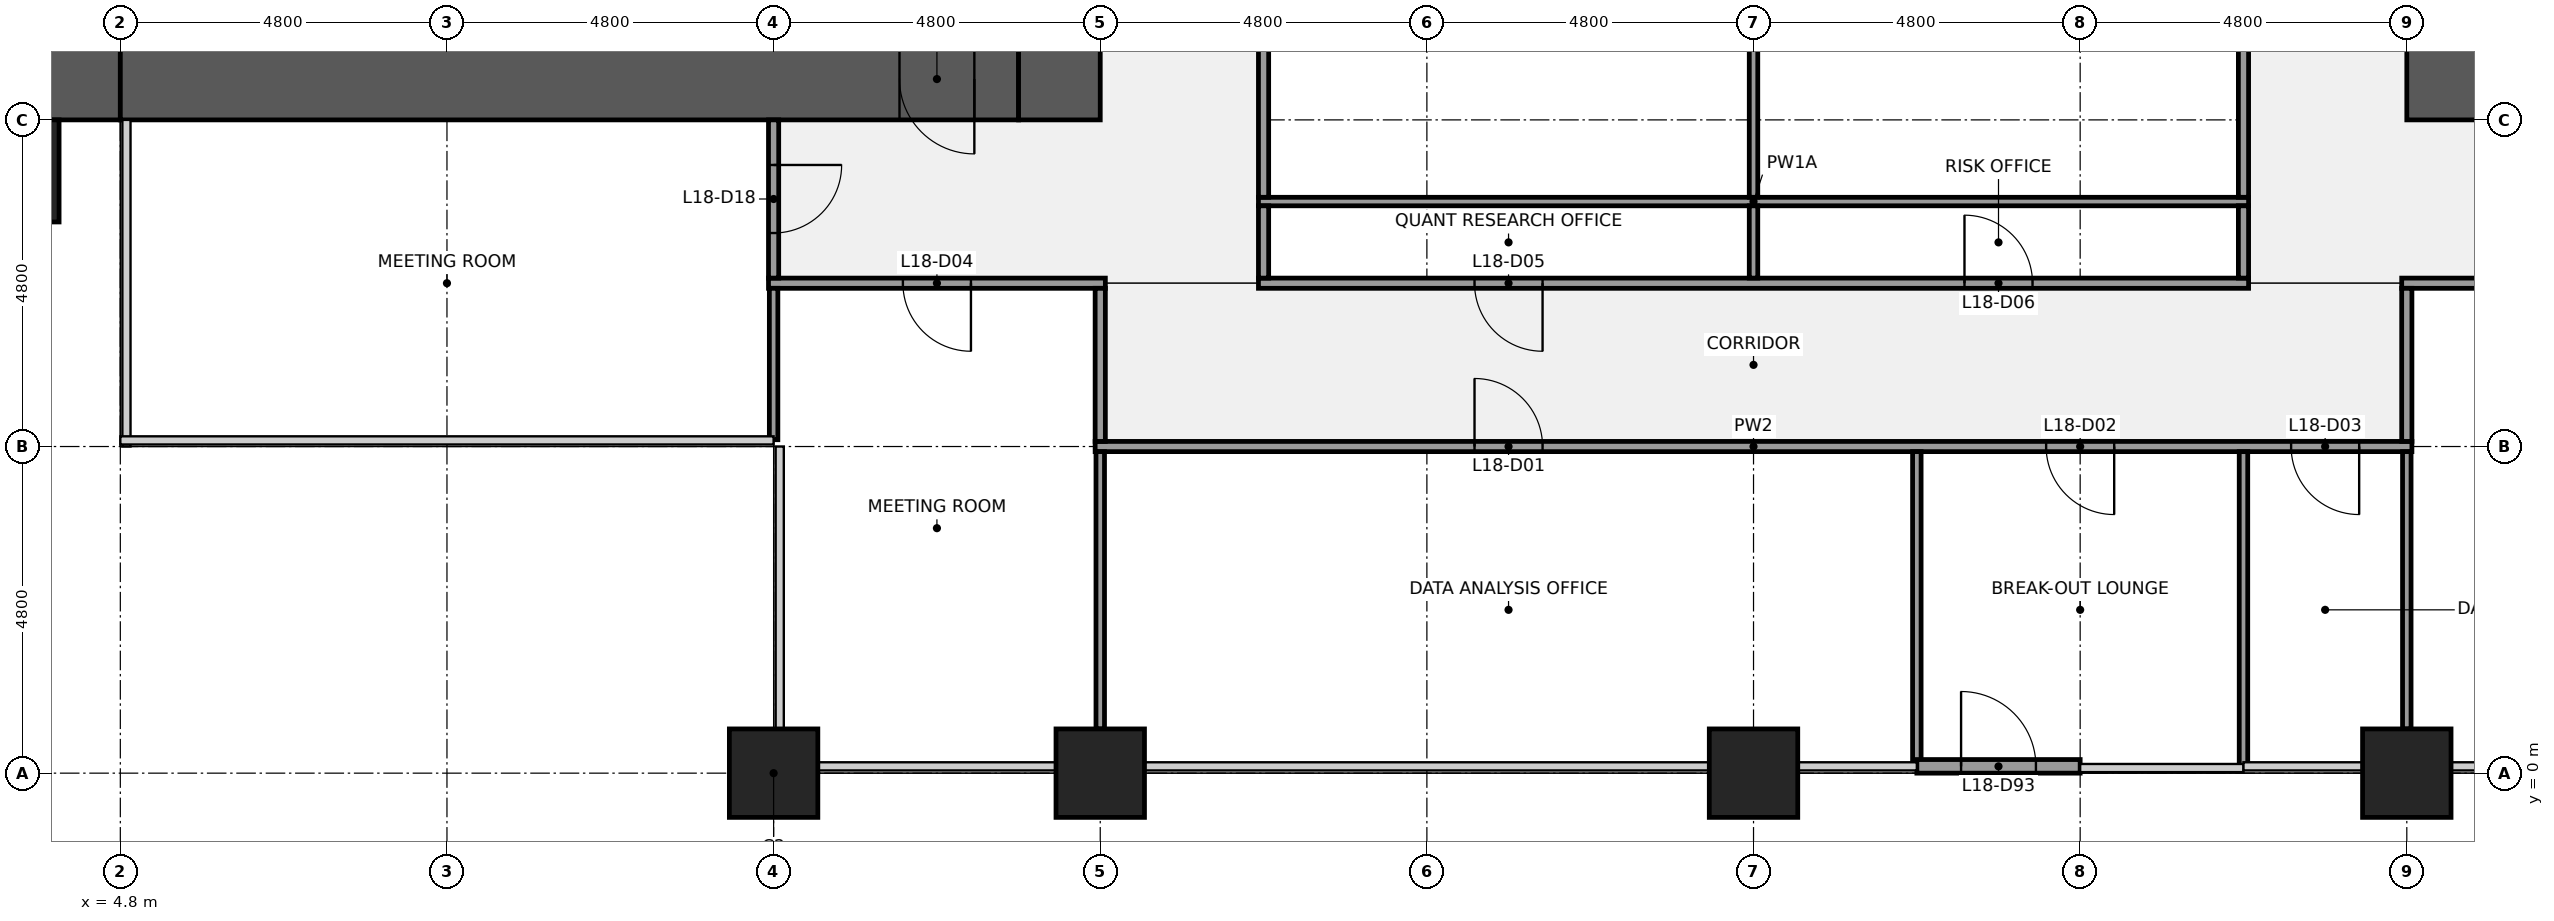
"""IFC4 building model, lengths in metres.
Left out: names, types, materials, properties, quantities, classifications, styles, units other than length and angle.
Written with IfcOpenShell. Run it as: python <this file> out.ifc"""

import sys

from ifc_helpers import new_model, si_unit, direction, frame, frame_2d, origin, origin_2d, place, context, subcontext, project, spatial, rectangle, extrude, element, fill, save


model = new_model("IFC4")
c1 = context("Model", 3, precision=1e-05, world=origin(), true_north=direction((0.0, 1.0)))
c2 = subcontext(c1, "Body", "Model", "MODEL_VIEW")
j1 = project(units=[si_unit("LENGTHUNIT", "METRE"), si_unit("PLANEANGLEUNIT", "RADIAN")], contexts=[c1])
p1 = place(None, origin())
s1 = spatial("IfcSite", under=j1, at=p1, CompositionType="ELEMENT")
p2 = place(p1, origin())
s2 = spatial("IfcBuilding", under=s1, at=p2, CompositionType="ELEMENT")
p3 = place(p2, frame((0.0, 0.0, 83.0)))
s3 = spatial("IfcBuildingStorey", under=s2, at=p3, CompositionType="ELEMENT", Elevation=83.0)
for number, where, z_axis, x_axis in (
    (1, (14.4, 0.0, 0.0), (0.0, 0.0, 1.0), (1.0, 0.0, 0.0)),
    (2, (19.2, 0.0, 0.0), (0.0, 0.0, 1.0), (1.0, 0.0, 0.0)),
    (3, (28.8, 0.0, 0.0), (0.0, 0.0, 1.0), (1.0, 0.0, 0.0)),
    (4, (38.4, 0.0, 0.0), (0.0, 0.0, 1.0), (1.0, 0.0, 0.0)),
):
    element("IfcColumn", number, at=place(p3, frame(where, z_axis=z_axis, x_axis=x_axis)), inside=s3, PredefinedType="COLUMN", context=c2, shape_type="SweptSolid", body=[
        extrude(rectangle(XDim=1.3, YDim=1.3, at=origin_2d()), origin(), (0.0, 0.0, 1.0), 4.0),
    ])
p4 = place(p3, frame((4.8, 10.2, 0.0), z_axis=(0.0, 0.0, 1.0), x_axis=(-1.0, 0.0, 0.0)))
e5 = element("IfcWall", 5, at=p4, inside=s3, PredefinedType="SHEAR", context=c2, shape_type="SweptSolid", body=[
    extrude(rectangle(XDim=3.6, YDim=1.2, at=frame_2d((1.8, 0.0))), origin(), (0.0, 0.0, 1.0), 3.7),
])
p5 = place(p3, frame((18.0, 10.2, 0.0), z_axis=(0.0, 0.0, 1.0), x_axis=(-1.0, 0.0, 0.0)))
e6 = element("IfcWall", 6, at=p5, inside=s3, PredefinedType="SHEAR", context=c2, shape_type="SweptSolid", body=[
    extrude(rectangle(XDim=13.2, YDim=1.2, at=frame_2d((6.6, 0.0))), origin(), (0.0, 0.0, 1.0), 3.7),
])
p6 = place(p5, frame((0.65, 0.0, 0.0)))
e7 = element("IfcOpeningElement", 7, at=p6, cuts=e6, PredefinedType="OPENING", context=c2, shape_type="SweptSolid", body=[
    extrude(rectangle(XDim=1.1, YDim=2.1, at=frame_2d((0.55, 1.05))), frame((0.0, 0.61, 0.0), z_axis=(0.0, -1.0, 0.0), x_axis=(1.0, 0.0, 0.0)), (0.0, 0.0, 1.0), 1.22),
])
p7 = place(p3, frame((18.6, 38.4, 0.0), z_axis=(0.0, 0.0, 1.0), x_axis=(0.0, -1.0, 0.0)))
e8 = element("IfcWall", 8, at=p7, inside=s3, PredefinedType="SHEAR", context=c2, shape_type="SweptSolid", body=[
    extrude(rectangle(XDim=28.8, YDim=1.2, at=frame_2d((14.4, 0.0))), origin(), (0.0, 0.0, 1.0), 3.7),
])
p8 = place(p7, frame((18.3, 0.0, 0.0)))
e9 = element("IfcOpeningElement", 9, at=p8, cuts=e8, PredefinedType="OPENING", context=c2, shape_type="SweptSolid", body=[
    extrude(rectangle(XDim=1.8, YDim=2.1, at=frame_2d((0.9, 1.05))), frame((0.0, 0.61, 0.0), z_axis=(0.0, -1.0, 0.0), x_axis=(1.0, 0.0, 0.0)), (0.0, 0.0, 1.0), 1.22),
])
p9 = place(p7, frame((8.7, 0.0, 0.0)))
e10 = element("IfcOpeningElement", 10, at=p9, cuts=e8, PredefinedType="OPENING", context=c2, shape_type="SweptSolid", body=[
    extrude(rectangle(XDim=1.8, YDim=2.1, at=frame_2d((0.9, 1.05))), frame((0.0, 0.61, 0.0), z_axis=(0.0, -1.0, 0.0), x_axis=(1.0, 0.0, 0.0)), (0.0, 0.0, 1.0), 1.22),
])
p10 = place(p3, frame((39.0, 9.6, 0.0), z_axis=(0.0, 0.0, 1.0), x_axis=(0.0, 1.0, 0.0)))
e11 = element("IfcWall", 11, at=p10, inside=s3, PredefinedType="SHEAR", context=c2, shape_type="SweptSolid", body=[
    extrude(rectangle(XDim=28.8, YDim=1.2, at=frame_2d((14.4, 0.0))), origin(), (0.0, 0.0, 1.0), 3.7),
])
p11 = place(p10, frame((8.7, 0.0, 0.0)))
e12 = element("IfcOpeningElement", 12, at=p11, cuts=e11, PredefinedType="OPENING", context=c2, shape_type="SweptSolid", body=[
    extrude(rectangle(XDim=1.8, YDim=2.1, at=frame_2d((0.9, 1.05))), frame((0.0, 0.61, 0.0), z_axis=(0.0, -1.0, 0.0), x_axis=(1.0, 0.0, 0.0)), (0.0, 0.0, 1.0), 1.22),
])
p12 = place(p10, frame((18.3, 0.0, 0.0)))
e13 = element("IfcOpeningElement", 13, at=p12, cuts=e11, PredefinedType="OPENING", context=c2, shape_type="SweptSolid", body=[
    extrude(rectangle(XDim=1.8, YDim=2.1, at=frame_2d((0.9, 1.05))), frame((0.0, 0.61, 0.0), z_axis=(0.0, -1.0, 0.0), x_axis=(1.0, 0.0, 0.0)), (0.0, 0.0, 1.0), 1.22),
])
p13 = place(p3, frame((19.125, 4.8, 0.0), z_axis=(0.0, 0.0, 1.0), x_axis=(1.0, 0.0, 0.0)))
e14 = element("IfcWall", 14, at=p13, inside=s3, PredefinedType="PARTITIONING", context=c2, shape_type="SweptSolid", body=[
    extrude(rectangle(XDim=19.35, YDim=0.15, at=frame_2d((9.675, 0.0))), origin(), (0.0, 0.0, 1.0), 2.709),
])
p14 = place(p13, frame((5.575, 0.0, 0.0)))
e15 = element("IfcOpeningElement", 15, at=p14, cuts=e14, PredefinedType="OPENING", context=c2, shape_type="SweptSolid", body=[
    extrude(rectangle(XDim=1.0, YDim=2.1, at=frame_2d((0.5, 1.05))), frame((0.0, 0.085, 0.0), z_axis=(0.0, -1.0, 0.0), x_axis=(1.0, 0.0, 0.0)), (0.0, 0.0, 1.0), 0.17),
])
p15 = place(p13, frame((13.975, 0.0, 0.0)))
e16 = element("IfcOpeningElement", 16, at=p15, cuts=e14, PredefinedType="OPENING", context=c2, shape_type="SweptSolid", body=[
    extrude(rectangle(XDim=1.0, YDim=2.1, at=frame_2d((0.5, 1.05))), frame((0.0, 0.085, 0.0), z_axis=(0.0, -1.0, 0.0), x_axis=(1.0, 0.0, 0.0)), (0.0, 0.0, 1.0), 0.17),
])
p16 = place(p13, frame((17.575, 0.0, 0.0)))
e17 = element("IfcOpeningElement", 17, at=p16, cuts=e14, PredefinedType="OPENING", context=c2, shape_type="SweptSolid", body=[
    extrude(rectangle(XDim=1.0, YDim=2.1, at=frame_2d((0.5, 1.05))), frame((0.0, 0.085, 0.0), z_axis=(0.0, -1.0, 0.0), x_axis=(1.0, 0.0, 0.0)), (0.0, 0.0, 1.0), 0.17),
])
p17 = place(p3, frame((14.325, 7.2, 0.0), z_axis=(0.0, 0.0, 1.0), x_axis=(1.0, 0.0, 0.0)))
e18 = element("IfcWall", 18, at=p17, inside=s3, PredefinedType="PARTITIONING", context=c2, shape_type="SweptSolid", body=[
    extrude(rectangle(XDim=4.95, YDim=0.15, at=frame_2d((2.475, 0.0))), origin(), (0.0, 0.0, 1.0), 2.709),
])
p18 = place(p17, frame((1.975, 0.0, 0.0)))
e19 = element("IfcOpeningElement", 19, at=p18, cuts=e18, PredefinedType="OPENING", context=c2, shape_type="SweptSolid", body=[
    extrude(rectangle(XDim=1.0, YDim=2.1, at=frame_2d((0.5, 1.05))), frame((0.0, 0.085, 0.0), z_axis=(0.0, -1.0, 0.0), x_axis=(1.0, 0.0, 0.0)), (0.0, 0.0, 1.0), 0.17),
])
p19 = place(p3, frame((21.525, 7.2, 0.0), z_axis=(0.0, 0.0, 1.0), x_axis=(1.0, 0.0, 0.0)))
e20 = element("IfcWall", 20, at=p19, inside=s3, PredefinedType="PARTITIONING", context=c2, shape_type="SweptSolid", body=[
    extrude(rectangle(XDim=14.55, YDim=0.15, at=frame_2d((7.275, 0.0))), origin(), (0.0, 0.0, 1.0), 2.709),
])
p20 = place(p19, frame((3.175, 0.0, 0.0)))
e21 = element("IfcOpeningElement", 21, at=p20, cuts=e20, PredefinedType="OPENING", context=c2, shape_type="SweptSolid", body=[
    extrude(rectangle(XDim=1.0, YDim=2.1, at=frame_2d((0.5, 1.05))), frame((0.0, 0.085, 0.0), z_axis=(0.0, -1.0, 0.0), x_axis=(1.0, 0.0, 0.0)), (0.0, 0.0, 1.0), 0.17),
])
p21 = place(p19, frame((10.375, 0.0, 0.0)))
e22 = element("IfcOpeningElement", 22, at=p21, cuts=e20, PredefinedType="OPENING", context=c2, shape_type="SweptSolid", body=[
    extrude(rectangle(XDim=1.0, YDim=2.1, at=frame_2d((0.5, 1.05))), frame((0.0, 0.085, 0.0), z_axis=(0.0, -1.0, 0.0), x_axis=(1.0, 0.0, 0.0)), (0.0, 0.0, 1.0), 0.17),
])
p22 = place(p3, frame((38.325, 7.2, 0.0), z_axis=(0.0, 0.0, 1.0), x_axis=(1.0, 0.0, 0.0)))
e23 = element("IfcWall", 23, at=p22, inside=s3, PredefinedType="PARTITIONING", context=c2, shape_type="SweptSolid", body=[
    extrude(rectangle(XDim=4.95, YDim=0.15, at=frame_2d((2.475, 0.0))), origin(), (0.0, 0.0, 1.0), 2.709),
])
p23 = place(p22, frame((1.975, 0.0, 0.0)))
e24 = element("IfcOpeningElement", 24, at=p23, cuts=e23, PredefinedType="OPENING", context=c2, shape_type="SweptSolid", body=[
    extrude(rectangle(XDim=1.0, YDim=2.1, at=frame_2d((0.5, 1.05))), frame((0.0, 0.085, 0.0), z_axis=(0.0, -1.0, 0.0), x_axis=(1.0, 0.0, 0.0)), (0.0, 0.0, 1.0), 0.17),
])
p24 = place(p3, frame((21.525, 8.4, 0.0), z_axis=(0.0, 0.0, 1.0), x_axis=(1.0, 0.0, 0.0)))
e25 = element("IfcWall", 25, at=p24, inside=s3, PredefinedType="PARTITIONING", context=c2, shape_type="SweptSolid", body=[
    extrude(rectangle(XDim=14.55, YDim=0.125, at=frame_2d((7.275, 0.0))), origin(), (0.0, 0.0, 1.0), 2.709),
])
p25 = place(p3, frame((14.4, 4.9, 0.0), z_axis=(0.0, 0.0, 1.0), x_axis=(0.0, 1.0, 0.0)))
e26 = element("IfcWall", 26, at=p25, inside=s3, PredefinedType="PARTITIONING", context=c2, shape_type="SweptSolid", body=[
    extrude(rectangle(XDim=2.225, YDim=0.125, at=frame_2d((1.113, 0.0))), origin(), (0.0, 0.0, 1.0), 2.709),
])
p26 = place(p3, frame((14.4, 7.275, 0.0), z_axis=(0.0, 0.0, 1.0), x_axis=(0.0, 1.0, 0.0)))
e27 = element("IfcWall", 27, at=p26, inside=s3, PredefinedType="PARTITIONING", context=c2, shape_type="SweptSolid", body=[
    extrude(rectangle(XDim=2.325, YDim=0.15, at=frame_2d((1.163, 0.0))), origin(), (0.0, 0.0, 1.0), 2.709),
])
p27 = place(p26, frame((0.663, 0.0, 0.0)))
e28 = element("IfcOpeningElement", 28, at=p27, cuts=e27, PredefinedType="OPENING", context=c2, shape_type="SweptSolid", body=[
    extrude(rectangle(XDim=1.0, YDim=2.1, at=frame_2d((0.5, 1.05))), frame((0.0, 0.085, 0.0), z_axis=(0.0, -1.0, 0.0), x_axis=(1.0, 0.0, 0.0)), (0.0, 0.0, 1.0), 0.17),
])
p28 = place(p3, frame((19.2, 0.65, 0.0), z_axis=(0.0, 0.0, 1.0), x_axis=(0.0, 1.0, 0.0)))
e29 = element("IfcWall", 29, at=p28, inside=s3, PredefinedType="PARTITIONING", context=c2, shape_type="SweptSolid", body=[
    extrude(rectangle(XDim=4.075, YDim=0.125, at=frame_2d((2.038, 0.0))), origin(), (0.0, 0.0, 1.0), 2.709),
])
p29 = place(p3, frame((19.2, 4.875, 0.0), z_axis=(0.0, 0.0, 1.0), x_axis=(0.0, 1.0, 0.0)))
e30 = element("IfcWall", 30, at=p29, inside=s3, PredefinedType="PARTITIONING", context=c2, shape_type="SweptSolid", body=[
    extrude(rectangle(XDim=2.25, YDim=0.15, at=frame_2d((1.125, 0.0))), origin(), (0.0, 0.0, 1.0), 2.709),
])
p30 = place(p3, frame((21.6, 7.275, 0.0), z_axis=(0.0, 0.0, 1.0), x_axis=(0.0, 1.0, 0.0)))
e31 = element("IfcWall", 31, at=p30, inside=s3, PredefinedType="PARTITIONING", context=c2, shape_type="SweptSolid", body=[
    extrude(rectangle(XDim=1.062, YDim=0.15, at=frame_2d((0.531, 0.0))), origin(), (0.0, 0.0, 1.0), 2.709),
])
p31 = place(p3, frame((21.6, 8.462, 0.0), z_axis=(0.0, 0.0, 1.0), x_axis=(0.0, 1.0, 0.0)))
e32 = element("IfcWall", 32, at=p31, inside=s3, PredefinedType="PARTITIONING", context=c2, shape_type="SweptSolid", body=[
    extrude(rectangle(XDim=5.875, YDim=0.15, at=frame_2d((2.938, 0.0))), origin(), (0.0, 0.0, 1.0), 2.709),
])
p32 = place(p31, frame((2.438, 0.0, 0.0)))
e33 = element("IfcOpeningElement", 33, at=p32, cuts=e32, PredefinedType="OPENING", context=c2, shape_type="SweptSolid", body=[
    extrude(rectangle(XDim=1.0, YDim=2.1, at=frame_2d((0.5, 1.05))), frame((0.0, 0.085, 0.0), z_axis=(0.0, -1.0, 0.0), x_axis=(1.0, 0.0, 0.0)), (0.0, 0.0, 1.0), 0.17),
])
p33 = place(p3, frame((28.8, 7.275, 0.0), z_axis=(0.0, 0.0, 1.0), x_axis=(0.0, 1.0, 0.0)))
e34 = element("IfcWall", 34, at=p33, inside=s3, PredefinedType="PARTITIONING", context=c2, shape_type="SweptSolid", body=[
    extrude(rectangle(XDim=1.062, YDim=0.125, at=frame_2d((0.531, 0.0))), origin(), (0.0, 0.0, 1.0), 2.709),
])
p34 = place(p3, frame((28.8, 8.462, 0.0), z_axis=(0.0, 0.0, 1.0), x_axis=(0.0, 1.0, 0.0)))
e35 = element("IfcWall", 35, at=p34, inside=s3, PredefinedType="PARTITIONING", context=c2, shape_type="SweptSolid", body=[
    extrude(rectangle(XDim=5.875, YDim=0.125, at=frame_2d((2.938, 0.0))), origin(), (0.0, 0.0, 1.0), 2.709),
])
for number, where, z_axis, x_axis in (
    (36, (31.2, 0.1, 0.0), (0.0, 0.0, 1.0), (0.0, 1.0, 0.0)),
    (37, (36.0, 0.1, 0.0), (0.0, 0.0, 1.0), (0.0, 1.0, 0.0)),
):
    element("IfcWall", number, at=place(p3, frame(where, z_axis=z_axis, x_axis=x_axis)), inside=s3, PredefinedType="PARTITIONING", context=c2, shape_type="SweptSolid", body=[
        extrude(rectangle(XDim=4.625, YDim=0.125, at=frame_2d((2.312, 0.0))), origin(), (0.0, 0.0, 1.0), 2.709),
    ])
p35 = place(p3, frame((36.0, 7.275, 0.0), z_axis=(0.0, 0.0, 1.0), x_axis=(0.0, 1.0, 0.0)))
e38 = element("IfcWall", 38, at=p35, inside=s3, PredefinedType="PARTITIONING", context=c2, shape_type="SweptSolid", body=[
    extrude(rectangle(XDim=1.062, YDim=0.15, at=frame_2d((0.531, 0.0))), origin(), (0.0, 0.0, 1.0), 2.709),
])
p36 = place(p3, frame((36.0, 8.462, 0.0), z_axis=(0.0, 0.0, 1.0), x_axis=(0.0, 1.0, 0.0)))
e39 = element("IfcWall", 39, at=p36, inside=s3, PredefinedType="PARTITIONING", context=c2, shape_type="SweptSolid", body=[
    extrude(rectangle(XDim=5.875, YDim=0.15, at=frame_2d((2.938, 0.0))), origin(), (0.0, 0.0, 1.0), 2.709),
])
p37 = place(p36, frame((2.438, 0.0, 0.0)))
e40 = element("IfcOpeningElement", 40, at=p37, cuts=e39, PredefinedType="OPENING", context=c2, shape_type="SweptSolid", body=[
    extrude(rectangle(XDim=1.0, YDim=2.1, at=frame_2d((0.5, 1.05))), frame((0.0, 0.085, 0.0), z_axis=(0.0, -1.0, 0.0), x_axis=(1.0, 0.0, 0.0)), (0.0, 0.0, 1.0), 0.17),
])
p38 = place(p3, frame((38.4, 0.65, 0.0), z_axis=(0.0, 0.0, 1.0), x_axis=(0.0, 1.0, 0.0)))
e41 = element("IfcWall", 41, at=p38, inside=s3, PredefinedType="PARTITIONING", context=c2, shape_type="SweptSolid", body=[
    extrude(rectangle(XDim=4.075, YDim=0.125, at=frame_2d((2.038, 0.0))), origin(), (0.0, 0.0, 1.0), 2.709),
])
p39 = place(p3, frame((38.4, 4.875, 0.0), z_axis=(0.0, 0.0, 1.0), x_axis=(0.0, 1.0, 0.0)))
e42 = element("IfcWall", 42, at=p39, inside=s3, PredefinedType="PARTITIONING", context=c2, shape_type="SweptSolid", body=[
    extrude(rectangle(XDim=2.25, YDim=0.15, at=frame_2d((1.125, 0.0))), origin(), (0.0, 0.0, 1.0), 2.709),
])
p40 = place(p3, frame((2.4, 8.85, 0.0), z_axis=(0.0, 0.0, 1.0), x_axis=(1.0, 0.0, 0.0)))
e43 = element("IfcColumn", 43, at=p40, inside=s3, PredefinedType="PILASTER", context=c2, shape_type="SweptSolid", body=[
    extrude(rectangle(XDim=3.0, YDim=1.5, at=origin_2d()), origin(), (0.0, 0.0, 1.0), 4.0),
])
p41 = place(p3, frame((31.2, 0.1, 0.0), z_axis=(0.0, 0.0, 1.0), x_axis=(1.0, 0.0, 0.0)))
e44 = element("IfcWall", 44, at=p41, inside=s3, PredefinedType="SOLIDWALL", context=c2, shape_type="SweptSolid", body=[
    extrude(rectangle(XDim=2.4, YDim=0.2, at=frame_2d((1.2, 0.0))), origin(), (0.0, 0.0, 1.0), 3.301),
])
p42 = place(p41, frame((0.65, 0.0, 0.0)))
e45 = element("IfcOpeningElement", 45, at=p42, cuts=e44, PredefinedType="OPENING", context=c2, shape_type="SweptSolid", body=[
    extrude(rectangle(XDim=1.1, YDim=2.1, at=frame_2d((0.55, 1.05))), frame((0.0, 0.11, 0.0), z_axis=(0.0, -1.0, 0.0), x_axis=(1.0, 0.0, 0.0)), (0.0, 0.0, 1.0), 0.22),
])
for number, where, z_axis, x_axis in (
    (46, (14.4, -1.075, 0.0), (0.0, 0.0, 1.0), (1.0, 0.0, 0.0)),
    (47, (19.2, -1.075, 0.0), (0.0, 0.0, 1.0), (1.0, 0.0, 0.0)),
    (48, (38.4, -1.075, 0.0), (0.0, 0.0, 1.0), (1.0, 0.0, 0.0)),
):
    element("IfcColumn", number, at=place(p3, frame(where, z_axis=z_axis, x_axis=x_axis)), inside=s3, PredefinedType="PILASTER", context=c2, shape_type="SweptSolid", body=[
        extrude(rectangle(XDim=4.2, YDim=0.85, at=origin_2d()), origin(), (0.0, 0.0, 1.0), 4.0),
    ])
p43 = place(p6, origin())
e49 = element("IfcDoor", 49, at=p43, inside=s3, OperationType="SINGLE_SWING_LEFT", PredefinedType="DOOR", context=c2, shape_type="SweptSolid", body=[
    extrude(rectangle(XDim=1.1, YDim=2.1, at=frame_2d((0.55, 1.05))), frame((0.0, 0.025, 0.0), z_axis=(0.0, -1.0, 0.0), x_axis=(1.0, 0.0, 0.0)), (0.0, 0.0, 1.0), 0.05),
])
fill(e7, e49)
p44 = place(p14, origin())
e50 = element("IfcDoor", 50, at=p44, inside=s3, OperationType="SINGLE_SWING_LEFT", PredefinedType="DOOR", context=c2, shape_type="SweptSolid", body=[
    extrude(rectangle(XDim=1.0, YDim=2.1, at=frame_2d((0.5, 1.05))), frame((0.0, 0.025, 0.0), z_axis=(0.0, -1.0, 0.0), x_axis=(1.0, 0.0, 0.0)), (0.0, 0.0, 1.0), 0.05),
])
fill(e15, e50)
p45 = place(p15, origin())
e51 = element("IfcDoor", 51, at=p45, inside=s3, OperationType="SINGLE_SWING_RIGHT", PredefinedType="DOOR", context=c2, shape_type="SweptSolid", body=[
    extrude(rectangle(XDim=1.0, YDim=2.1, at=frame_2d((0.5, 1.05))), frame((0.0, 0.025, 0.0), z_axis=(0.0, -1.0, 0.0), x_axis=(1.0, 0.0, 0.0)), (0.0, 0.0, 1.0), 0.05),
])
fill(e16, e51)
p46 = place(p16, origin())
e52 = element("IfcDoor", 52, at=p46, inside=s3, OperationType="SINGLE_SWING_RIGHT", PredefinedType="DOOR", context=c2, shape_type="SweptSolid", body=[
    extrude(rectangle(XDim=1.0, YDim=2.1, at=frame_2d((0.5, 1.05))), frame((0.0, 0.025, 0.0), z_axis=(0.0, -1.0, 0.0), x_axis=(1.0, 0.0, 0.0)), (0.0, 0.0, 1.0), 0.05),
])
fill(e17, e52)
p47 = place(p18, origin())
e53 = element("IfcDoor", 53, at=p47, inside=s3, OperationType="SINGLE_SWING_RIGHT", PredefinedType="DOOR", context=c2, shape_type="SweptSolid", body=[
    extrude(rectangle(XDim=1.0, YDim=2.1, at=frame_2d((0.5, 1.05))), frame((0.0, 0.025, 0.0), z_axis=(0.0, -1.0, 0.0), x_axis=(1.0, 0.0, 0.0)), (0.0, 0.0, 1.0), 0.05),
])
fill(e19, e53)
p48 = place(p20, origin())
e54 = element("IfcDoor", 54, at=p48, inside=s3, OperationType="SINGLE_SWING_RIGHT", PredefinedType="DOOR", context=c2, shape_type="SweptSolid", body=[
    extrude(rectangle(XDim=1.0, YDim=2.1, at=frame_2d((0.5, 1.05))), frame((0.0, 0.025, 0.0), z_axis=(0.0, -1.0, 0.0), x_axis=(1.0, 0.0, 0.0)), (0.0, 0.0, 1.0), 0.05),
])
fill(e21, e54)
p49 = place(p21, origin())
e55 = element("IfcDoor", 55, at=p49, inside=s3, OperationType="SINGLE_SWING_LEFT", PredefinedType="DOOR", context=c2, shape_type="SweptSolid", body=[
    extrude(rectangle(XDim=1.0, YDim=2.1, at=frame_2d((0.5, 1.05))), frame((0.0, 0.025, 0.0), z_axis=(0.0, -1.0, 0.0), x_axis=(1.0, 0.0, 0.0)), (0.0, 0.0, 1.0), 0.05),
])
fill(e22, e55)
p50 = place(p27, origin())
e56 = element("IfcDoor", 56, at=p50, inside=s3, OperationType="SINGLE_SWING_RIGHT", PredefinedType="DOOR", context=c2, shape_type="SweptSolid", body=[
    extrude(rectangle(XDim=1.0, YDim=2.1, at=frame_2d((0.5, 1.05))), frame((0.0, 0.025, 0.0), z_axis=(0.0, -1.0, 0.0), x_axis=(1.0, 0.0, 0.0)), (0.0, 0.0, 1.0), 0.05),
])
fill(e28, e56)
p51 = place(p42, origin())
e57 = element("IfcDoor", 57, at=p51, inside=s3, OperationType="SINGLE_SWING_LEFT", PredefinedType="DOOR", context=c2, shape_type="SweptSolid", body=[
    extrude(rectangle(XDim=1.1, YDim=2.1, at=frame_2d((0.55, 1.05))), frame((0.0, 0.025, 0.0), z_axis=(0.0, -1.0, 0.0), x_axis=(1.0, 0.0, 0.0)), (0.0, 0.0, 1.0), 0.05),
])
fill(e45, e57)
save(model, sys.argv[1])
